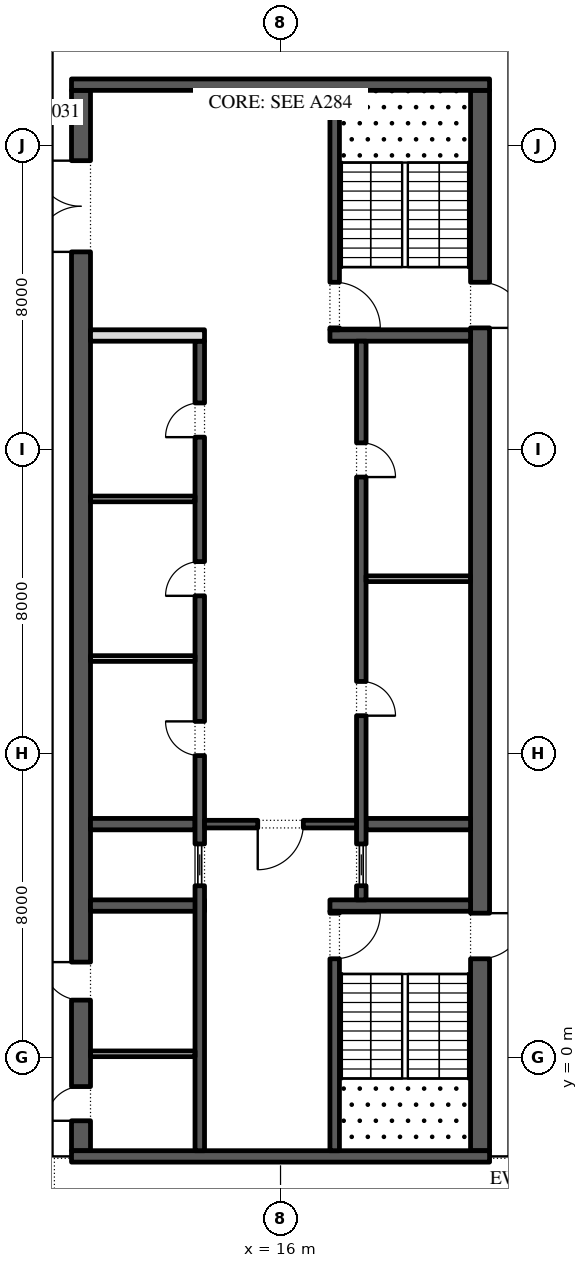
"""IFC4 building model, lengths in metres.
Left out: names, types, materials, properties, quantities, classifications, styles, units other than length and angle.
Written with IfcOpenShell. Run it as: python <this file> out.ifc"""

import sys

from ifc_helpers import new_model, si_unit, direction, frame, frame_2d, origin, place, context, subcontext, project, spatial, rectangle, extrude, element, fill, save


model = new_model("IFC4")
c1 = context("Model", 3, precision=1e-05, world=origin(), true_north=direction((0.0, 1.0)))
c2 = subcontext(c1, "Body", "Model", "MODEL_VIEW")
j1 = project(units=[si_unit("LENGTHUNIT", "METRE"), si_unit("PLANEANGLEUNIT", "RADIAN")], contexts=[c1])
p1 = place(None, origin())
s1 = spatial("IfcSite", under=j1, at=p1, CompositionType="ELEMENT")
p2 = place(p1, origin())
s2 = spatial("IfcBuilding", under=s1, at=p2, CompositionType="ELEMENT")
p3 = place(p2, frame((0.0, 0.0, 369.0)))
s3 = spatial("IfcBuildingStorey", under=s2, at=p3, CompositionType="ELEMENT", Elevation=369.0)
p4 = place(p3, frame((21.25, -2.45, 0.0), z_axis=(0.0, 0.0, 1.0), x_axis=(0.0, 1.0, 0.0)))
e1 = element("IfcWall", 1, at=p4, inside=s3, PredefinedType="SHEAR", context=c2, shape_type="SweptSolid", body=[
    extrude(rectangle(XDim=27.9, YDim=0.5, at=frame_2d((13.95, 0.0))), origin(), (0.0, 0.0, 1.0), 4.0),
])
p5 = place(p4, frame((5.05, 0.0, 0.0)))
e2 = element("IfcOpeningElement", 2, at=p5, cuts=e1, PredefinedType="OPENING", context=c2, shape_type="SweptSolid", body=[
    extrude(rectangle(XDim=1.2, YDim=2.1, at=frame_2d((0.6, 1.05))), frame((0.0, 0.26, 0.0), z_axis=(0.0, -1.0, 0.0), x_axis=(1.0, 0.0, 0.0)), (0.0, 0.0, 1.0), 0.52),
])
p6 = place(p4, frame((21.65, 0.0, 0.0)))
e3 = element("IfcOpeningElement", 3, at=p6, cuts=e1, PredefinedType="OPENING", context=c2, shape_type="SweptSolid", body=[
    extrude(rectangle(XDim=1.2, YDim=2.1, at=frame_2d((0.6, 1.05))), frame((0.0, 0.26, 0.0), z_axis=(0.0, -1.0, 0.0), x_axis=(1.0, 0.0, 0.0)), (0.0, 0.0, 1.0), 0.52),
])
p7 = place(p3, frame((10.75, -2.45, 0.0), z_axis=(0.0, 0.0, 1.0), x_axis=(0.0, 1.0, 0.0)))
e4 = element("IfcWall", 4, at=p7, inside=s3, PredefinedType="SHEAR", context=c2, shape_type="SweptSolid", body=[
    extrude(rectangle(XDim=27.9, YDim=0.5, at=frame_2d((13.95, 0.0))), origin(), (0.0, 0.0, 1.0), 4.0),
])
p8 = place(p7, frame((23.65, 0.0, 0.0)))
e5 = element("IfcOpeningElement", 5, at=p8, cuts=e4, PredefinedType="OPENING", context=c2, shape_type="SweptSolid", body=[
    extrude(rectangle(XDim=2.4, YDim=2.1, at=frame_2d((1.2, 1.05))), frame((0.0, 0.26, 0.0), z_axis=(0.0, -1.0, 0.0), x_axis=(1.0, 0.0, 0.0)), (0.0, 0.0, 1.0), 0.52),
])
p9 = place(p7, frame((0.788, 0.0, 0.0)))
e6 = element("IfcOpeningElement", 6, at=p9, cuts=e4, PredefinedType="OPENING", context=c2, shape_type="SweptSolid", body=[
    extrude(rectangle(XDim=0.9, YDim=2.1, at=frame_2d((0.45, 1.05))), frame((0.0, 0.26, 0.0), z_axis=(0.0, -1.0, 0.0), x_axis=(1.0, 0.0, 0.0)), (0.0, 0.0, 1.0), 0.52),
])
p10 = place(p7, frame((3.962, 0.0, 0.0)))
e7 = element("IfcOpeningElement", 7, at=p10, cuts=e4, PredefinedType="OPENING", context=c2, shape_type="SweptSolid", body=[
    extrude(rectangle(XDim=1.0, YDim=2.1, at=frame_2d((0.5, 1.05))), frame((0.0, 0.26, 0.0), z_axis=(0.0, -1.0, 0.0), x_axis=(1.0, 0.0, 0.0)), (0.0, 0.0, 1.0), 0.52),
])
for number, where, z_axis, x_axis in (
    (8, (10.5, -2.6, 0.0), (0.0, 0.0, 1.0), (1.0, 0.0, 0.0)),
    (9, (10.5, 25.6, 0.0), (0.0, 0.0, 1.0), (1.0, 0.0, 0.0)),
):
    element("IfcWall", number, at=place(p3, frame(where, z_axis=z_axis, x_axis=x_axis)), inside=s3, PredefinedType="SHEAR", context=c2, shape_type="SweptSolid", body=[
        extrude(rectangle(XDim=11.0, YDim=0.3, at=frame_2d((5.5, 0.0))), origin(), (0.0, 0.0, 1.0), 4.0),
    ])
p11 = place(p3, frame((17.3, 4.0, 0.0), z_axis=(0.0, 0.0, 1.0), x_axis=(1.0, 0.0, 0.0)))
e10 = element("IfcWall", 10, at=p11, inside=s3, PredefinedType="SHEAR", context=c2, shape_type="SweptSolid", body=[
    extrude(rectangle(XDim=3.7, YDim=0.3, at=frame_2d((1.85, 0.0))), origin(), (0.0, 0.0, 1.0), 4.0),
])
p12 = place(p3, frame((17.425, -2.45, 0.0), z_axis=(0.0, 0.0, 1.0), x_axis=(0.0, 1.0, 0.0)))
e11 = element("IfcWall", 11, at=p12, inside=s3, PredefinedType="SHEAR", context=c2, shape_type="SweptSolid", body=[
    extrude(rectangle(XDim=6.3, YDim=0.25, at=frame_2d((3.15, 0.0))), origin(), (0.0, 0.0, 1.0), 4.0),
])
p13 = place(p12, frame((5.05, 0.0, 0.0)))
e12 = element("IfcOpeningElement", 12, at=p13, cuts=e11, PredefinedType="OPENING", context=c2, shape_type="SweptSolid", body=[
    extrude(rectangle(XDim=1.2, YDim=2.1, at=frame_2d((0.6, 1.05))), frame((0.0, 0.135, 0.0), z_axis=(0.0, -1.0, 0.0), x_axis=(1.0, 0.0, 0.0)), (0.0, 0.0, 1.0), 0.27),
])
p14 = place(p3, frame((17.3, 19.0, 0.0), z_axis=(0.0, 0.0, 1.0), x_axis=(1.0, 0.0, 0.0)))
e13 = element("IfcWall", 13, at=p14, inside=s3, PredefinedType="SHEAR", context=c2, shape_type="SweptSolid", body=[
    extrude(rectangle(XDim=3.7, YDim=0.3, at=frame_2d((1.85, 0.0))), origin(), (0.0, 0.0, 1.0), 4.0),
])
p15 = place(p3, frame((17.425, 19.15, 0.0), z_axis=(0.0, 0.0, 1.0), x_axis=(0.0, 1.0, 0.0)))
e14 = element("IfcWall", 14, at=p15, inside=s3, PredefinedType="SHEAR", context=c2, shape_type="SweptSolid", body=[
    extrude(rectangle(XDim=6.3, YDim=0.25, at=frame_2d((3.15, 0.0))), origin(), (0.0, 0.0, 1.0), 4.0),
])
p16 = place(p15, frame((0.05, 0.0, 0.0)))
e15 = element("IfcOpeningElement", 15, at=p16, cuts=e14, PredefinedType="OPENING", context=c2, shape_type="SweptSolid", body=[
    extrude(rectangle(XDim=1.2, YDim=2.1, at=frame_2d((0.6, 1.05))), frame((0.0, 0.135, 0.0), z_axis=(0.0, -1.0, 0.0), x_axis=(1.0, 0.0, 0.0)), (0.0, 0.0, 1.0), 0.27),
])
p17 = place(p3, frame((18.25, 6.143, 0.0), z_axis=(0.0, 0.0, 1.0), x_axis=(1.0, 0.0, 0.0)))
e16 = element("IfcWall", 16, at=p17, inside=s3, PredefinedType="SHEAR", context=c2, shape_type="SweptSolid", body=[
    extrude(rectangle(XDim=2.75, YDim=0.3, at=frame_2d((1.375, 0.0))), origin(), (0.0, 0.0, 1.0), 4.0),
])
p18 = place(p3, frame((18.125, 4.15, 0.0), z_axis=(0.0, 0.0, 1.0), x_axis=(0.0, 1.0, 0.0)))
e17 = element("IfcWall", 17, at=p18, inside=s3, PredefinedType="SHEAR", context=c2, shape_type="SweptSolid", body=[
    extrude(rectangle(XDim=14.7, YDim=0.25, at=frame_2d((7.35, 0.0))), origin(), (0.0, 0.0, 1.0), 4.0),
])
p19 = place(p18, frame((4.846, 0.0, 0.0)))
e18 = element("IfcOpeningElement", 18, at=p19, cuts=e17, PredefinedType="OPENING", context=c2, shape_type="SweptSolid", body=[
    extrude(rectangle(XDim=0.9, YDim=2.1, at=frame_2d((0.45, 1.05))), frame((0.0, 0.135, 0.0), z_axis=(0.0, -1.0, 0.0), x_axis=(1.0, 0.0, 0.0)), (0.0, 0.0, 1.0), 0.27),
])
p20 = place(p18, frame((11.125, 0.0, 0.0)))
e19 = element("IfcOpeningElement", 19, at=p20, cuts=e17, PredefinedType="OPENING", context=c2, shape_type="SweptSolid", body=[
    extrude(rectangle(XDim=0.9, YDim=2.1, at=frame_2d((0.45, 1.05))), frame((0.0, 0.135, 0.0), z_axis=(0.0, -1.0, 0.0), x_axis=(1.0, 0.0, 0.0)), (0.0, 0.0, 1.0), 0.27),
])
p21 = place(p18, frame((0.371, 0.0, 0.0)))
e20 = element("IfcOpeningElement", 20, at=p21, cuts=e17, PredefinedType="OPENING", context=c2, shape_type="SweptSolid", body=[
    extrude(rectangle(XDim=1.1, YDim=2.1, at=frame_2d((0.55, 1.05))), frame((0.0, 0.135, 0.0), z_axis=(0.0, -1.0, 0.0), x_axis=(1.0, 0.0, 0.0)), (0.0, 0.0, 1.0), 0.27),
])
p22 = place(p3, frame((18.25, 12.6, 0.0), z_axis=(0.0, 0.0, 1.0), x_axis=(1.0, 0.0, 0.0)))
e21 = element("IfcWall", 21, at=p22, inside=s3, PredefinedType="PARTITIONING", context=c2, shape_type="SweptSolid", body=[
    extrude(rectangle(XDim=2.75, YDim=0.15, at=frame_2d((1.375, 0.0))), origin(), (0.0, 0.0, 1.0), 4.0),
])
p23 = place(p3, frame((11.0, 4.0, 0.0), z_axis=(0.0, 0.0, 1.0), x_axis=(1.0, 0.0, 0.0)))
e22 = element("IfcWall", 22, at=p23, inside=s3, PredefinedType="SHEAR", context=c2, shape_type="SweptSolid", body=[
    extrude(rectangle(XDim=3.0, YDim=0.3, at=frame_2d((1.5, 0.0))), origin(), (0.0, 0.0, 1.0), 4.0),
])
p24 = place(p3, frame((11.0, 6.143, 0.0), z_axis=(0.0, 0.0, 1.0), x_axis=(1.0, 0.0, 0.0)))
e23 = element("IfcWall", 23, at=p24, inside=s3, PredefinedType="SHEAR", context=c2, shape_type="SweptSolid", body=[
    extrude(rectangle(XDim=2.75, YDim=0.3, at=frame_2d((1.375, 0.0))), origin(), (0.0, 0.0, 1.0), 4.0),
])
p25 = place(p3, frame((13.875, -2.45, 0.0), z_axis=(0.0, 0.0, 1.0), x_axis=(0.0, 1.0, 0.0)))
e24 = element("IfcWall", 24, at=p25, inside=s3, PredefinedType="SHEAR", context=c2, shape_type="SweptSolid", body=[
    extrude(rectangle(XDim=21.3, YDim=0.25, at=frame_2d((10.65, 0.0))), origin(), (0.0, 0.0, 1.0), 4.0),
])
p26 = place(p25, frame((10.396, 0.0, 0.0)))
e25 = element("IfcOpeningElement", 25, at=p26, cuts=e24, PredefinedType="OPENING", context=c2, shape_type="SweptSolid", body=[
    extrude(rectangle(XDim=0.9, YDim=2.1, at=frame_2d((0.45, 1.05))), frame((0.0, 0.135, 0.0), z_axis=(0.0, -1.0, 0.0), x_axis=(1.0, 0.0, 0.0)), (0.0, 0.0, 1.0), 0.27),
])
p27 = place(p25, frame((14.6, 0.0, 0.0)))
e26 = element("IfcOpeningElement", 26, at=p27, cuts=e24, PredefinedType="OPENING", context=c2, shape_type="SweptSolid", body=[
    extrude(rectangle(XDim=0.9, YDim=2.1, at=frame_2d((0.45, 1.05))), frame((0.0, 0.135, 0.0), z_axis=(0.0, -1.0, 0.0), x_axis=(1.0, 0.0, 0.0)), (0.0, 0.0, 1.0), 0.27),
])
p28 = place(p25, frame((18.775, 0.0, 0.0)))
e27 = element("IfcOpeningElement", 27, at=p28, cuts=e24, PredefinedType="OPENING", context=c2, shape_type="SweptSolid", body=[
    extrude(rectangle(XDim=0.9, YDim=2.1, at=frame_2d((0.45, 1.05))), frame((0.0, 0.135, 0.0), z_axis=(0.0, -1.0, 0.0), x_axis=(1.0, 0.0, 0.0)), (0.0, 0.0, 1.0), 0.27),
])
p29 = place(p25, frame((6.971, 0.0, 0.0)))
e28 = element("IfcOpeningElement", 28, at=p29, cuts=e24, PredefinedType="OPENING", context=c2, shape_type="SweptSolid", body=[
    extrude(rectangle(XDim=1.1, YDim=2.1, at=frame_2d((0.55, 1.05))), frame((0.0, 0.135, 0.0), z_axis=(0.0, -1.0, 0.0), x_axis=(1.0, 0.0, 0.0)), (0.0, 0.0, 1.0), 0.27),
])
p30 = place(p3, frame((11.0, 19.0, 0.0), z_axis=(0.0, 0.0, 1.0), x_axis=(1.0, 0.0, 0.0)))
e29 = element("IfcWall", 29, at=p30, inside=s3, PredefinedType="PARTITIONING", context=c2, shape_type="SweptSolid", body=[
    extrude(rectangle(XDim=3.0, YDim=0.3, at=frame_2d((1.5, 0.0))), origin(), (0.0, 0.0, 1.0), 4.0),
])
for number, where, z_axis, x_axis in (
    (30, (11.0, 10.5, 0.0), (0.0, 0.0, 1.0), (1.0, 0.0, 0.0)),
    (31, (11.0, 14.7, 0.0), (0.0, 0.0, 1.0), (1.0, 0.0, 0.0)),
):
    element("IfcWall", number, at=place(p3, frame(where, z_axis=z_axis, x_axis=x_axis)), inside=s3, PredefinedType="PARTITIONING", context=c2, shape_type="SweptSolid", body=[
        extrude(rectangle(XDim=2.75, YDim=0.15, at=frame_2d((1.375, 0.0))), origin(), (0.0, 0.0, 1.0), 4.0),
    ])
p31 = place(p3, frame((14.0, 6.143, 0.0), z_axis=(0.0, 0.0, 1.0), x_axis=(1.0, 0.0, 0.0)))
e32 = element("IfcWall", 32, at=p31, inside=s3, PredefinedType="SHEAR", context=c2, shape_type="SweptSolid", body=[
    extrude(rectangle(XDim=4.0, YDim=0.2, at=frame_2d((2.0, 0.0))), origin(), (0.0, 0.0, 1.0), 4.0),
])
p32 = place(p31, frame((1.4, 0.0, 0.0)))
e33 = element("IfcOpeningElement", 33, at=p32, cuts=e32, PredefinedType="OPENING", context=c2, shape_type="SweptSolid", body=[
    extrude(rectangle(XDim=1.2, YDim=2.1, at=frame_2d((0.6, 1.05))), frame((0.0, 0.11, 0.0), z_axis=(0.0, -1.0, 0.0), x_axis=(1.0, 0.0, 0.0)), (0.0, 0.0, 1.0), 0.22),
])
p33 = place(p3, frame((11.0, 0.1, 0.0), z_axis=(0.0, 0.0, 1.0), x_axis=(1.0, 0.0, 0.0)))
e34 = element("IfcWall", 34, at=p33, inside=s3, PredefinedType="PARTITIONING", context=c2, shape_type="SweptSolid", body=[
    extrude(rectangle(XDim=2.75, YDim=0.15, at=frame_2d((1.375, 0.0))), origin(), (0.0, 0.0, 1.0), 4.0),
])
p34 = place(p19, frame((0.9, -0.2, 0.0), z_axis=(0.0, 0.0, 1.0), x_axis=(-1.0, 0.0, 0.0)))
e35 = element("IfcDoor", 35, at=p34, inside=s3, OperationType="SINGLE_SWING_LEFT", PredefinedType="DOOR", context=c2, shape_type="SweptSolid", body=[
    extrude(rectangle(XDim=0.9, YDim=2.1, at=frame_2d((0.45, 1.05))), frame((0.0, -0.075, 0.0), z_axis=(0.0, -1.0, 0.0), x_axis=(1.0, 0.0, 0.0)), (0.0, 0.0, 1.0), 0.05),
])
fill(e18, e35)
p35 = place(p20, frame((0.9, -0.2, 0.0), z_axis=(0.0, 0.0, 1.0), x_axis=(-1.0, 0.0, 0.0)))
e36 = element("IfcDoor", 36, at=p35, inside=s3, OperationType="SINGLE_SWING_LEFT", PredefinedType="DOOR", context=c2, shape_type="SweptSolid", body=[
    extrude(rectangle(XDim=0.9, YDim=2.1, at=frame_2d((0.45, 1.05))), frame((0.0, -0.075, 0.0), z_axis=(0.0, -1.0, 0.0), x_axis=(1.0, 0.0, 0.0)), (0.0, 0.0, 1.0), 0.05),
])
fill(e19, e36)
p36 = place(p21, origin())
e37 = element("IfcDoor", 37, at=p36, inside=s3, OperationType="SLIDING_TO_LEFT", PredefinedType="DOOR", context=c2, shape_type="SweptSolid", body=[
    extrude(rectangle(XDim=1.1, YDim=2.1, at=frame_2d((0.55, 1.05))), frame((0.0, 0.025, 0.0), z_axis=(0.0, -1.0, 0.0), x_axis=(1.0, 0.0, 0.0)), (0.0, 0.0, 1.0), 0.05),
])
fill(e20, e37)
p37 = place(p26, origin())
e38 = element("IfcDoor", 38, at=p37, inside=s3, OperationType="SINGLE_SWING_LEFT", PredefinedType="DOOR", context=c2, shape_type="SweptSolid", body=[
    extrude(rectangle(XDim=0.9, YDim=2.1, at=frame_2d((0.45, 1.05))), frame((0.0, 0.125, 0.0), z_axis=(0.0, -1.0, 0.0), x_axis=(1.0, 0.0, 0.0)), (0.0, 0.0, 1.0), 0.05),
])
fill(e25, e38)
p38 = place(p27, origin())
e39 = element("IfcDoor", 39, at=p38, inside=s3, OperationType="SINGLE_SWING_RIGHT", PredefinedType="DOOR", context=c2, shape_type="SweptSolid", body=[
    extrude(rectangle(XDim=0.9, YDim=2.1, at=frame_2d((0.45, 1.05))), frame((0.0, 0.125, 0.0), z_axis=(0.0, -1.0, 0.0), x_axis=(1.0, 0.0, 0.0)), (0.0, 0.0, 1.0), 0.05),
])
fill(e26, e39)
p39 = place(p28, origin())
e40 = element("IfcDoor", 40, at=p39, inside=s3, OperationType="SINGLE_SWING_RIGHT", PredefinedType="DOOR", context=c2, shape_type="SweptSolid", body=[
    extrude(rectangle(XDim=0.9, YDim=2.1, at=frame_2d((0.45, 1.05))), frame((0.0, 0.125, 0.0), z_axis=(0.0, -1.0, 0.0), x_axis=(1.0, 0.0, 0.0)), (0.0, 0.0, 1.0), 0.05),
])
fill(e27, e40)
p40 = place(p29, origin())
e41 = element("IfcDoor", 41, at=p40, inside=s3, OperationType="SLIDING_TO_LEFT", PredefinedType="DOOR", context=c2, shape_type="SweptSolid", body=[
    extrude(rectangle(XDim=1.1, YDim=2.1, at=frame_2d((0.55, 1.05))), frame((0.0, 0.025, 0.0), z_axis=(0.0, -1.0, 0.0), x_axis=(1.0, 0.0, 0.0)), (0.0, 0.0, 1.0), 0.05),
])
fill(e28, e41)
p41 = place(p32, frame((1.2, 0.0, 0.0), z_axis=(0.0, 0.0, 1.0), x_axis=(-1.0, 0.0, 0.0)))
e42 = element("IfcDoor", 42, at=p41, inside=s3, OperationType="SINGLE_SWING_LEFT", PredefinedType="DOOR", context=c2, shape_type="SweptSolid", body=[
    extrude(rectangle(XDim=1.2, YDim=2.1, at=frame_2d((0.6, 1.05))), frame((0.0, 0.025, 0.0), z_axis=(0.0, -1.0, 0.0), x_axis=(1.0, 0.0, 0.0)), (0.0, 0.0, 1.0), 0.05),
])
fill(e33, e42)
p42 = place(p8, origin())
e43 = element("IfcDoor", 43, at=p42, inside=s3, OperationType="DOUBLE_DOOR_SINGLE_SWING", PredefinedType="DOOR", context=c2, shape_type="SweptSolid", body=[
    extrude(rectangle(XDim=2.4, YDim=2.1, at=frame_2d((1.2, 1.05))), frame((0.0, 0.025, 0.0), z_axis=(0.0, -1.0, 0.0), x_axis=(1.0, 0.0, 0.0)), (0.0, 0.0, 1.0), 0.05),
])
fill(e5, e43)
p43 = place(p13, frame((1.2, 0.0, 0.0), z_axis=(0.0, 0.0, 1.0), x_axis=(-1.0, 0.0, 0.0)))
e44 = element("IfcDoor", 44, at=p43, inside=s3, OperationType="SINGLE_SWING_RIGHT", PredefinedType="DOOR", context=c2, shape_type="SweptSolid", body=[
    extrude(rectangle(XDim=1.2, YDim=2.1, at=frame_2d((0.6, 1.05))), frame((0.0, 0.025, 0.0), z_axis=(0.0, -1.0, 0.0), x_axis=(1.0, 0.0, 0.0)), (0.0, 0.0, 1.0), 0.05),
])
fill(e12, e44)
p44 = place(p5, frame((1.2, 0.0, 0.0), z_axis=(0.0, 0.0, 1.0), x_axis=(-1.0, 0.0, 0.0)))
e45 = element("IfcDoor", 45, at=p44, inside=s3, OperationType="SINGLE_SWING_RIGHT", PredefinedType="DOOR", context=c2, shape_type="SweptSolid", body=[
    extrude(rectangle(XDim=1.2, YDim=2.1, at=frame_2d((0.6, 1.05))), frame((0.0, 0.025, 0.0), z_axis=(0.0, -1.0, 0.0), x_axis=(1.0, 0.0, 0.0)), (0.0, 0.0, 1.0), 0.05),
])
fill(e2, e45)
p45 = place(p16, frame((1.2, 0.0, 0.0), z_axis=(0.0, 0.0, 1.0), x_axis=(-1.0, 0.0, 0.0)))
e46 = element("IfcDoor", 46, at=p45, inside=s3, OperationType="SINGLE_SWING_LEFT", PredefinedType="DOOR", context=c2, shape_type="SweptSolid", body=[
    extrude(rectangle(XDim=1.2, YDim=2.1, at=frame_2d((0.6, 1.05))), frame((0.0, 0.025, 0.0), z_axis=(0.0, -1.0, 0.0), x_axis=(1.0, 0.0, 0.0)), (0.0, 0.0, 1.0), 0.05),
])
fill(e15, e46)
p46 = place(p6, frame((1.2, 0.0, 0.0), z_axis=(0.0, 0.0, 1.0), x_axis=(-1.0, 0.0, 0.0)))
e47 = element("IfcDoor", 47, at=p46, inside=s3, OperationType="SINGLE_SWING_LEFT", PredefinedType="DOOR", context=c2, shape_type="SweptSolid", body=[
    extrude(rectangle(XDim=1.2, YDim=2.1, at=frame_2d((0.6, 1.05))), frame((0.0, 0.025, 0.0), z_axis=(0.0, -1.0, 0.0), x_axis=(1.0, 0.0, 0.0)), (0.0, 0.0, 1.0), 0.05),
])
fill(e3, e47)
p47 = place(p9, origin())
e48 = element("IfcDoor", 48, at=p47, inside=s3, OperationType="SINGLE_SWING_RIGHT", PredefinedType="DOOR", context=c2, shape_type="SweptSolid", body=[
    extrude(rectangle(XDim=0.9, YDim=2.1, at=frame_2d((0.45, 1.05))), frame((0.0, -0.2, 0.0), z_axis=(0.0, -1.0, 0.0), x_axis=(1.0, 0.0, 0.0)), (0.0, 0.0, 1.0), 0.05),
])
fill(e6, e48)
p48 = place(p10, origin())
e49 = element("IfcDoor", 49, at=p48, inside=s3, OperationType="SINGLE_SWING_LEFT", PredefinedType="DOOR", context=c2, shape_type="SweptSolid", body=[
    extrude(rectangle(XDim=1.0, YDim=2.1, at=frame_2d((0.5, 1.05))), frame((0.0, -0.2, 0.0), z_axis=(0.0, -1.0, 0.0), x_axis=(1.0, 0.0, 0.0)), (0.0, 0.0, 1.0), 0.05),
])
fill(e7, e49)
save(model, sys.argv[1])
